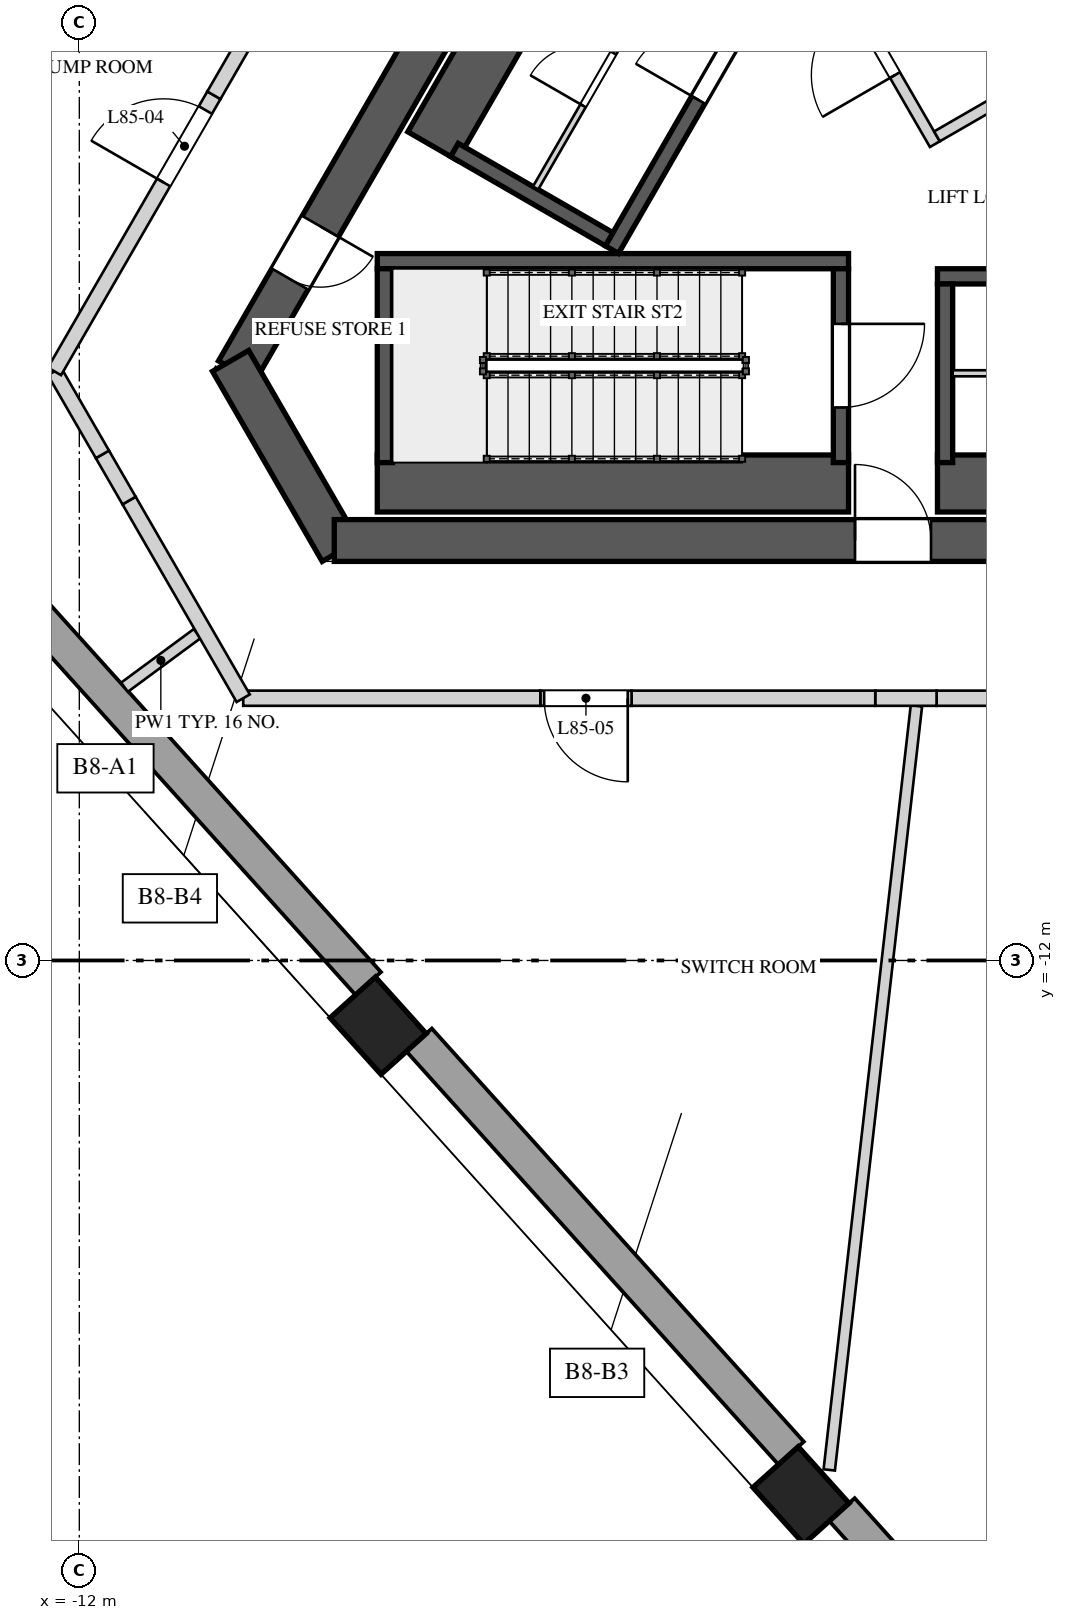
"""IFC4 building model, lengths in metres.
Left out: names, types, materials, properties, quantities, classifications, styles, units other than length and angle.
Written with IfcOpenShell. Run it as: python <this file> out.ifc"""

import sys

from ifc_helpers import new_model, si_unit, direction, frame, frame_2d, origin, origin_2d, place, context, subcontext, project, spatial, polyline, rectangle, outline, extrude, element, fill, save


model = new_model("IFC4")
c1 = context("Model", 3, precision=1e-05, world=origin(), true_north=direction((0.0, 1.0)))
c2 = subcontext(c1, "Body", "Model", "MODEL_VIEW")
j1 = project(units=[si_unit("LENGTHUNIT", "METRE"), si_unit("PLANEANGLEUNIT", "RADIAN")], contexts=[c1])
p1 = place(None, origin())
s1 = spatial("IfcSite", under=j1, at=p1, CompositionType="ELEMENT")
p2 = place(p1, origin())
s2 = spatial("IfcBuilding", under=s1, at=p2, CompositionType="ELEMENT")
p3 = place(p2, frame((0.0, 0.0, 370.4)))
s3 = spatial("IfcBuildingStorey", under=s2, at=p3, CompositionType="ELEMENT", Elevation=370.4)
p4 = place(p3, frame((-1.285, 10.725, 0.0), z_axis=(0.0, 0.0, 1.0), x_axis=(-0.499994590896, -0.86602852671, 0.0)))
e1 = element("IfcWall", 1, at=p4, inside=s3, PredefinedType="SHEAR", context=c2, shape_type="SweptSolid", body=[
    extrude(rectangle(XDim=17.292, YDim=0.55, at=frame_2d((8.646, 0.0))), origin(), (0.0, 0.0, 1.0), 4.5),
])
p5 = place(p4, frame((6.851, 0.0, 0.0)))
e2 = element("IfcOpeningElement", 2, at=p5, cuts=e1, PredefinedType="OPENING", context=c2, shape_type="SweptSolid", body=[
    extrude(rectangle(XDim=1.0, YDim=2.4, at=frame_2d((0.5, 1.2))), frame((0.0, 0.285, 0.0), z_axis=(0.0, -1.0, 0.0), x_axis=(1.0, 0.0, 0.0)), (0.0, 0.0, 1.0), 0.57),
])
p6 = place(p4, frame((15.089, 0.0, 0.0)))
e3 = element("IfcOpeningElement", 3, at=p6, cuts=e1, PredefinedType="OPENING", context=c2, shape_type="SweptSolid", body=[
    extrude(rectangle(XDim=0.8, YDim=2.1, at=frame_2d((0.4, 1.05))), frame((0.0, 0.285, 0.0), z_axis=(0.0, -1.0, 0.0), x_axis=(1.0, 0.0, 0.0)), (0.0, 0.0, 1.0), 0.57),
])
p7 = place(p3, frame((-10.01, -4.113, 0.0), z_axis=(0.0, 0.0, 1.0), x_axis=(0.499995765644, -0.866027848477, 0.0)))
e4 = element("IfcWall", 4, at=p7, inside=s3, PredefinedType="SHEAR", context=c2, shape_type="SweptSolid", body=[
    extrude(rectangle(XDim=2.887, YDim=0.55, at=frame_2d((1.443, 0.0))), origin(), (0.0, 0.0, 1.0), 4.5),
])
p8 = place(p3, frame((-8.646, -6.475, 0.0), z_axis=(0.0, 0.0, 1.0), x_axis=(1.0, 0.0, 0.0)))
e5 = element("IfcWall", 5, at=p8, inside=s3, PredefinedType="SHEAR", context=c2, shape_type="SweptSolid", body=[
    extrude(rectangle(XDim=17.292, YDim=0.55, at=frame_2d((8.646, 0.0))), origin(), (0.0, 0.0, 1.0), 4.5),
])
p9 = place(p8, frame((6.851, 0.0, 0.0)))
e6 = element("IfcOpeningElement", 6, at=p9, cuts=e5, PredefinedType="OPENING", context=c2, shape_type="SweptSolid", body=[
    extrude(rectangle(XDim=1.0, YDim=2.4, at=frame_2d((0.5, 1.2))), frame((0.0, 0.285, 0.0), z_axis=(0.0, -1.0, 0.0), x_axis=(1.0, 0.0, 0.0)), (0.0, 0.0, 1.0), 0.57),
])
p10 = place(p8, frame((15.089, 0.0, 0.0)))
e7 = element("IfcOpeningElement", 7, at=p10, cuts=e5, PredefinedType="OPENING", context=c2, shape_type="SweptSolid", body=[
    extrude(rectangle(XDim=0.8, YDim=2.1, at=frame_2d((0.4, 1.05))), frame((0.0, 0.285, 0.0), z_axis=(0.0, -1.0, 0.0), x_axis=(1.0, 0.0, 0.0)), (0.0, 0.0, 1.0), 0.57),
])
for number, where, z_axis, x_axis in (
    (8, (-8.068, -12.858, 0.0), (0.0, 0.0, 1.0), (0.669, -0.743, 0.0)),
    (9, (-2.505, -19.037, 0.0), (0.0, 0.0, 1.0), (0.669, -0.743, 0.0)),
):
    element("IfcColumn", number, at=place(p3, frame(where, z_axis=z_axis, x_axis=x_axis)), inside=s3, PredefinedType="COLUMN", context=c2, shape_type="SweptSolid", body=[
        extrude(rectangle(XDim=1.0, YDim=0.8, at=origin_2d()), origin(), (0.0, 0.0, 1.0), 4.5),
    ])
p11 = place(p3, frame((-13.093, -6.868, 0.0), z_axis=(0.0, 0.0, 1.0), x_axis=(0.669136224502, -0.74313976684, 0.0)))
e10 = element("IfcWall", 10, at=p11, inside=s3, PredefinedType="SOLIDWALL", context=c2, shape_type="SweptSolid", body=[
    extrude(rectangle(XDim=7.314, YDim=0.45, at=frame_2d((3.657, 0.0))), origin(), (0.0, 0.0, 1.0), 3.8),
])
p12 = place(p3, frame((-7.53, -13.046, 0.0), z_axis=(0.0, 0.0, 1.0), x_axis=(0.669152823362, -0.743124820597, 0.0)))
e11 = element("IfcWall", 11, at=p12, inside=s3, PredefinedType="SOLIDWALL", context=c2, shape_type="SweptSolid", body=[
    extrude(rectangle(XDim=7.314, YDim=0.45, at=frame_2d((3.657, 0.0))), origin(), (0.0, 0.0, 1.0), 3.8),
])
p13 = place(p3, frame((-1.966, -19.224, 0.0), z_axis=(0.0, 0.0, 1.0), x_axis=(0.66911941145, -0.743154905266, 0.0)))
e12 = element("IfcWall", 12, at=p13, inside=s3, PredefinedType="SOLIDWALL", context=c2, shape_type="SweptSolid", body=[
    extrude(rectangle(XDim=6.714, YDim=0.45, at=frame_2d((3.357, 0.0))), origin(), (0.0, 0.0, 1.0), 3.8),
])
p14 = place(p3, frame((-8.08, -5.725, 0.0), z_axis=(0.0, 0.0, 1.0), x_axis=(1.0, 0.0, 0.0)))
e13 = element("IfcWall", 13, at=p14, inside=s3, PredefinedType="SOLIDWALL", context=c2, shape_type="SweptSolid", body=[
    extrude(rectangle(XDim=6.2, YDim=0.75, at=frame_2d((3.1, 0.0))), origin(), (0.0, 0.0, 1.0), 4.15),
])
p15 = place(p3, frame((-8.08, -2.8, 0.0), z_axis=(0.0, 0.0, 1.0), x_axis=(1.0, 0.0, 0.0)))
e14 = element("IfcWall", 14, at=p15, inside=s3, PredefinedType="SOLIDWALL", context=c2, shape_type="SweptSolid", body=[
    extrude(rectangle(XDim=6.2, YDim=0.2, at=frame_2d((3.1, 0.0))), origin(), (0.0, 0.0, 1.0), 4.15),
])
p16 = place(p3, frame((-7.98, -2.9, 0.0), z_axis=(0.0, 0.0, 1.0), x_axis=(0.0, -1.0, 0.0)))
e15 = element("IfcWall", 15, at=p16, inside=s3, PredefinedType="SOLIDWALL", context=c2, shape_type="SweptSolid", body=[
    extrude(rectangle(XDim=2.55, YDim=0.2, at=frame_2d((1.275, 0.0))), origin(), (0.0, 0.0, 1.0), 4.15),
])
p17 = place(p3, frame((-1.98, -2.9, 0.0), z_axis=(0.0, 0.0, 1.0), x_axis=(0.0, -1.0, 0.0)))
e16 = element("IfcWall", 16, at=p17, inside=s3, PredefinedType="SOLIDWALL", context=c2, shape_type="SweptSolid", body=[
    extrude(rectangle(XDim=2.55, YDim=0.2, at=frame_2d((1.275, 0.0))), origin(), (0.0, 0.0, 1.0), 4.15),
])
p18 = place(p17, frame((0.725, 0.0, 0.0)))
e17 = element("IfcOpeningElement", 17, at=p18, cuts=e16, PredefinedType="OPENING", context=c2, shape_type="SweptSolid", body=[
    extrude(rectangle(XDim=1.1, YDim=2.4, at=frame_2d((0.55, 1.2))), frame((0.0, 0.11, 0.0), z_axis=(0.0, -1.0, 0.0), x_axis=(1.0, 0.0, 0.0)), (0.0, 0.0, 1.0), 0.22),
])
p19 = place(p3, frame((-4.993, -2.648, 0.0), z_axis=(0.0, 0.0, 1.0), x_axis=(0.499996545922, 0.866027397988, 0.0)))
e18 = element("IfcWall", 18, at=p19, inside=s3, PredefinedType="SOLIDWALL", context=c2, shape_type="SweptSolid", body=[
    extrude(rectangle(XDim=5.5, YDim=0.2, at=frame_2d((2.75, 0.0))), origin(), (0.0, 0.0, 1.0), 4.15),
])
p20 = place(p19, frame((2.275, 0.0, 0.0)))
e19 = element("IfcOpeningElement", 19, at=p20, cuts=e18, PredefinedType="OPENING", context=c2, shape_type="SweptSolid", body=[
    extrude(rectangle(XDim=0.95, YDim=2.4, at=frame_2d((0.475, 1.2))), frame((0.0, 0.11, 0.0), z_axis=(0.0, -1.0, 0.0), x_axis=(1.0, 0.0, 0.0)), (0.0, 0.0, 1.0), 0.22),
])
p21 = place(p3, frame((-4.603, 3.477, 0.0), z_axis=(0.0, 0.0, 1.0), x_axis=(-0.500015767406, -0.866016300277, 0.0)))
e20 = element("IfcWall", 20, at=p21, inside=s3, PredefinedType="SOLIDWALL", context=c2, shape_type="SweptSolid", body=[
    extrude(rectangle(XDim=5.5, YDim=0.75, at=frame_2d((2.75, 0.0))), origin(), (0.0, 0.0, 1.0), 4.15),
])
p22 = place(p3, frame((-5.03, -2.512, 0.0), z_axis=(0.0, 0.0, 1.0), x_axis=(-0.866016039709, 0.500016218704, 0.0)))
e21 = element("IfcWall", 21, at=p22, inside=s3, PredefinedType="SOLIDWALL", context=c2, shape_type="SweptSolid", body=[
    extrude(rectangle(XDim=2.35, YDim=0.2, at=frame_2d((1.175, 0.0))), origin(), (0.0, 0.0, 1.0), 4.15),
])
p23 = place(p3, frame((-5.997, -1.838, 0.0), z_axis=(0.0, 0.0, 1.0), x_axis=(0.500005610874, 0.86602216432, 0.0)))
e22 = element("IfcWall", 22, at=p23, inside=s3, PredefinedType="PARTITIONING", context=c2, shape_type="SweptSolid", body=[
    extrude(rectangle(XDim=5.1, YDim=0.08, at=frame_2d((2.55, 0.0))), origin(), (0.0, 0.0, 1.0), 4.15),
])
p24 = place(p23, frame((1.25, 0.0, 0.0)))
e23 = element("IfcOpeningElement", 23, at=p24, cuts=e22, PredefinedType="OPENING", context=c2, shape_type="SweptSolid", body=[
    extrude(rectangle(XDim=0.8, YDim=2.1, at=frame_2d((0.4, 1.05))), frame((0.0, 0.05, 0.0), z_axis=(0.0, -1.0, 0.0), x_axis=(1.0, 0.0, 0.0)), (0.0, 0.0, 1.0), 0.1),
])
p25 = place(p3, frame((4.79, -3.0, 0.0), z_axis=(0.0, 0.0, 1.0), x_axis=(-1.0, 0.0, 0.0)))
e24 = element("IfcWall", 24, at=p25, inside=s3, PredefinedType="SOLIDWALL", context=c2, shape_type="SweptSolid", body=[
    extrude(rectangle(XDim=5.5, YDim=0.2, at=frame_2d((2.75, 0.0))), origin(), (0.0, 0.0, 1.0), 4.15),
])
p26 = place(p25, frame((2.275, 0.0, 0.0)))
e25 = element("IfcOpeningElement", 25, at=p26, cuts=e24, PredefinedType="OPENING", context=c2, shape_type="SweptSolid", body=[
    extrude(rectangle(XDim=0.95, YDim=2.4, at=frame_2d((0.475, 1.2))), frame((0.0, 0.11, 0.0), z_axis=(0.0, -1.0, 0.0), x_axis=(1.0, 0.0, 0.0)), (0.0, 0.0, 1.0), 0.22),
])
p27 = place(p3, frame((-0.71, -5.725, 0.0), z_axis=(0.0, 0.0, 1.0), x_axis=(1.0, 0.0, 0.0)))
e26 = element("IfcWall", 26, at=p27, inside=s3, PredefinedType="SOLIDWALL", context=c2, shape_type="SweptSolid", body=[
    extrude(rectangle(XDim=5.5, YDim=0.75, at=frame_2d((2.75, 0.0))), origin(), (0.0, 0.0, 1.0), 4.15),
])
p28 = place(p3, frame((-0.61, -3.1, 0.0), z_axis=(0.0, 0.0, 1.0), x_axis=(0.0, -1.0, 0.0)))
e27 = element("IfcWall", 27, at=p28, inside=s3, PredefinedType="SOLIDWALL", context=c2, shape_type="SweptSolid", body=[
    extrude(rectangle(XDim=2.35, YDim=0.2, at=frame_2d((1.175, 0.0))), origin(), (0.0, 0.0, 1.0), 4.15),
])
p29 = place(p3, frame((4.59, -4.275, 0.0), z_axis=(0.0, 0.0, 1.0), x_axis=(-1.0, 0.0, 0.0)))
e28 = element("IfcWall", 28, at=p29, inside=s3, PredefinedType="PARTITIONING", context=c2, shape_type="SweptSolid", body=[
    extrude(rectangle(XDim=5.1, YDim=0.08, at=frame_2d((2.55, 0.0))), origin(), (0.0, 0.0, 1.0), 4.15),
])
p30 = place(p29, frame((1.25, 0.0, 0.0)))
e29 = element("IfcOpeningElement", 29, at=p30, cuts=e28, PredefinedType="OPENING", context=c2, shape_type="SweptSolid", body=[
    extrude(rectangle(XDim=0.8, YDim=2.1, at=frame_2d((0.4, 1.05))), frame((0.0, 0.05, 0.0), z_axis=(0.0, -1.0, 0.0), x_axis=(1.0, 0.0, 0.0)), (0.0, 0.0, 1.0), 0.1),
])
p31 = place(p3, frame((-0.744, -1.261, 0.0), z_axis=(0.0, 0.0, 1.0), x_axis=(-0.500004234368, 0.866022959057, 0.0)))
e30 = element("IfcWall", 30, at=p31, inside=s3, PredefinedType="PARTITIONING", context=c2, shape_type="SweptSolid", body=[
    extrude(rectangle(XDim=3.125, YDim=0.15, at=frame_2d((1.562, 0.0))), origin(), (0.0, 0.0, 1.0), 4.15),
])
p32 = place(p31, frame((1.05, 0.0, 0.0)))
e31 = element("IfcOpeningElement", 31, at=p32, cuts=e30, PredefinedType="OPENING", context=c2, shape_type="SweptSolid", body=[
    extrude(rectangle(XDim=1.1, YDim=2.4, at=frame_2d((0.55, 1.2))), frame((0.0, 0.085, 0.0), z_axis=(0.0, -1.0, 0.0), x_axis=(1.0, 0.0, 0.0)), (0.0, 0.0, 1.0), 0.17),
])
p33 = place(p3, frame((-0.717, -1.159, 0.0), z_axis=(0.0, 0.0, 1.0), x_axis=(0.866008176907, 0.50002983664, 0.0)))
e32 = element("IfcWall", 32, at=p33, inside=s3, PredefinedType="PARTITIONING", context=c2, shape_type="SweptSolid", body=[
    extrude(rectangle(XDim=3.3, YDim=0.15, at=frame_2d((1.65, 0.0))), origin(), (0.0, 0.0, 1.0), 4.15),
])
p34 = place(p3, frame((-10.45, -7.701, 0.0), z_axis=(0.0, 0.0, 1.0), x_axis=(-0.805029994767, -0.593234108532, 0.0)))
e33 = element("IfcWall", 33, at=p34, inside=s3, PredefinedType="PARTITIONING", context=c2, shape_type="SweptSolid", body=[
    extrude(rectangle(XDim=1.187, YDim=0.15, at=frame_2d((0.594, 0.0))), origin(), (0.0, 0.0, 1.0), 4.15),
])
p35 = place(p3, frame((-0.987, -8.65, 0.0), z_axis=(0.0, 0.0, 1.0), x_axis=(-0.113368279169, -0.99355303496, 0.0)))
e34 = element("IfcWall", 34, at=p35, inside=s3, PredefinedType="PARTITIONING", context=c2, shape_type="SweptSolid", body=[
    extrude(rectangle(XDim=10.117, YDim=0.15, at=frame_2d((5.059, 0.0))), origin(), (0.0, 0.0, 1.0), 3.25),
])
p36 = place(p3, frame((0.159, -8.55, 0.0), z_axis=(0.0, 0.0, 1.0), x_axis=(-1.0, 0.0, 0.0)))
e35 = element("IfcWall", 35, at=p36, inside=s3, PredefinedType="SOLIDWALL", context=c2, shape_type="SweptSolid", body=[
    extrude(rectangle(XDim=0.881, YDim=0.2, at=frame_2d((0.44, 0.0))), origin(), (0.0, 0.0, 1.0), 4.15),
])
p37 = place(p3, frame((-0.722, -8.55, 0.0), z_axis=(0.0, 0.0, 1.0), x_axis=(-1.0, 0.0, 0.0)))
e36 = element("IfcWall", 36, at=p37, inside=s3, PredefinedType="SOLIDWALL", context=c2, shape_type="SweptSolid", body=[
    extrude(rectangle(XDim=0.807, YDim=0.2, at=frame_2d((0.403, 0.0))), origin(), (0.0, 0.0, 1.0), 3.25),
])
p38 = place(p3, frame((-1.529, -8.55, 0.0), z_axis=(0.0, 0.0, 1.0), x_axis=(-1.0, 0.0, 0.0)))
e37 = element("IfcWall", 37, at=p38, inside=s3, PredefinedType="SOLIDWALL", context=c2, shape_type="SweptSolid", body=[
    extrude(rectangle(XDim=3.206, YDim=0.2, at=frame_2d((1.603, 0.0))), origin(), (0.0, 0.0, 1.0), 4.15),
])
p39 = place(p3, frame((-4.735, -8.55, 0.0), z_axis=(0.0, 0.0, 1.0), x_axis=(-1.0, 0.0, 0.0)))
e38 = element("IfcWall", 38, at=p39, inside=s3, PredefinedType="SOLIDWALL", context=c2, shape_type="SweptSolid", body=[
    extrude(outline(polyline([(0.0, 0.0), (1.2, 0.0), (1.2, 4.15), (1.043, 4.15), (1.043, 3.45), (0.217, 3.45), (0.217, 4.15), (0.0, 4.15), (0.0, 0.0)])), frame((0.0, 0.1, 0.0), z_axis=(0.0, -1.0, 0.0), x_axis=(1.0, 0.0, 0.0)), (0.0, 0.0, 1.0), 0.2),
])
p40 = place(p39, frame((0.05, 0.0, 0.0)))
e39 = element("IfcOpeningElement", 39, at=p40, cuts=e38, PredefinedType="OPENING", context=c2, shape_type="SweptSolid", body=[
    extrude(rectangle(XDim=1.1, YDim=2.4, at=frame_2d((0.55, 1.2))), frame((0.0, 0.11, 0.0), z_axis=(0.0, -1.0, 0.0), x_axis=(1.0, 0.0, 0.0)), (0.0, 0.0, 1.0), 0.22),
])
p41 = place(p3, frame((-5.935, -8.55, 0.0), z_axis=(0.0, 0.0, 1.0), x_axis=(-1.0, 0.0, 0.0)))
e40 = element("IfcWall", 40, at=p41, inside=s3, PredefinedType="SOLIDWALL", context=c2, shape_type="SweptSolid", body=[
    extrude(rectangle(XDim=3.909, YDim=0.2, at=frame_2d((1.955, 0.0))), origin(), (0.0, 0.0, 1.0), 4.15),
])
p42 = place(p3, frame((-9.844, -8.55, 0.0), z_axis=(0.0, 0.0, 1.0), x_axis=(-0.500003959331, 0.866023117852, 0.0)))
e41 = element("IfcWall", 41, at=p42, inside=s3, PredefinedType="SOLIDWALL", context=c2, shape_type="SweptSolid", body=[
    extrude(rectangle(XDim=3.003, YDim=0.2, at=frame_2d((1.501, 0.0))), origin(), (0.0, 0.0, 1.0), 4.15),
])
p43 = place(p3, frame((-11.345, -5.949, 0.0), z_axis=(0.0, 0.0, 1.0), x_axis=(-0.499993523031, 0.866029143232, 0.0)))
e42 = element("IfcWall", 42, at=p43, inside=s3, PredefinedType="SOLIDWALL", context=c2, shape_type="SweptSolid", body=[
    extrude(rectangle(XDim=0.702, YDim=0.2, at=frame_2d((0.351, 0.0))), origin(), (0.0, 0.0, 1.0), 3.45),
])
p44 = place(p3, frame((-11.696, -5.342, 0.0), z_axis=(0.0, 0.0, 1.0), x_axis=(-0.500013012896, 0.866017890655, 0.0)))
e43 = element("IfcWall", 43, at=p44, inside=s3, PredefinedType="SOLIDWALL", context=c2, shape_type="SweptSolid", body=[
    extrude(rectangle(XDim=1.261, YDim=0.2, at=frame_2d((0.63, 0.0))), origin(), (0.0, 0.0, 1.0), 4.15),
])
p45 = place(p3, frame((-12.326, -4.25, 0.0), z_axis=(0.0, 0.0, 1.0), x_axis=(0.499982771656, 0.866035350345, 0.0)))
e44 = element("IfcWall", 44, at=p45, inside=s3, PredefinedType="SOLIDWALL", context=c2, shape_type="SweptSolid", body=[
    extrude(rectangle(XDim=4.195, YDim=0.2, at=frame_2d((2.097, 0.0))), origin(), (0.0, 0.0, 1.0), 4.15),
])
p46 = place(p45, frame((2.87, 0.0, 0.0)))
e45 = element("IfcOpeningElement", 45, at=p46, cuts=e44, PredefinedType="OPENING", context=c2, shape_type="SweptSolid", body=[
    extrude(rectangle(XDim=1.1, YDim=2.4, at=frame_2d((0.55, 1.2))), frame((0.0, 0.11, 0.0), z_axis=(0.0, -1.0, 0.0), x_axis=(1.0, 0.0, 0.0)), (0.0, 0.0, 1.0), 0.22),
])
p47 = place(p3, frame((-10.229, -0.617, 0.0), z_axis=(0.0, 0.0, 1.0), x_axis=(0.5001686003, 0.865928040471, 0.0)))
e46 = element("IfcWall", 46, at=p47, inside=s3, PredefinedType="SOLIDWALL", context=c2, shape_type="SweptSolid", body=[
    extrude(rectangle(XDim=0.821, YDim=0.2, at=frame_2d((0.411, 0.0))), origin(), (0.0, 0.0, 1.0), 3.45),
])
p48 = place(p18, origin())
e47 = element("IfcDoor", 47, at=p48, inside=s3, OperationType="SINGLE_SWING_LEFT", PredefinedType="DOOR", context=c2, shape_type="SweptSolid", body=[
    extrude(rectangle(XDim=1.1, YDim=2.4, at=frame_2d((0.55, 1.2))), frame((0.0, 0.025, 0.0), z_axis=(0.0, -1.0, 0.0), x_axis=(1.0, 0.0, 0.0)), (0.0, 0.0, 1.0), 0.05),
])
fill(e17, e47)
p49 = place(p20, origin())
e48 = element("IfcDoor", 48, at=p49, inside=s3, OperationType="SINGLE_SWING_LEFT", PredefinedType="DOOR", context=c2, shape_type="SweptSolid", body=[
    extrude(rectangle(XDim=0.95, YDim=2.4, at=frame_2d((0.475, 1.2))), frame((0.0, 0.025, 0.0), z_axis=(0.0, -1.0, 0.0), x_axis=(1.0, 0.0, 0.0)), (0.0, 0.0, 1.0), 0.05),
])
fill(e19, e48)
p50 = place(p24, origin())
e49 = element("IfcDoor", 49, at=p50, inside=s3, OperationType="SINGLE_SWING_RIGHT", PredefinedType="DOOR", context=c2, shape_type="SweptSolid", body=[
    extrude(rectangle(XDim=0.8, YDim=2.1, at=frame_2d((0.4, 1.05))), frame((0.0, 0.025, 0.0), z_axis=(0.0, -1.0, 0.0), x_axis=(1.0, 0.0, 0.0)), (0.0, 0.0, 1.0), 0.05),
])
fill(e23, e49)
p51 = place(p32, origin())
e50 = element("IfcDoor", 50, at=p51, inside=s3, OperationType="SINGLE_SWING_LEFT", PredefinedType="DOOR", context=c2, shape_type="SweptSolid", body=[
    extrude(rectangle(XDim=1.1, YDim=2.4, at=frame_2d((0.55, 1.2))), frame((0.0, 0.025, 0.0), z_axis=(0.0, -1.0, 0.0), x_axis=(1.0, 0.0, 0.0)), (0.0, 0.0, 1.0), 0.05),
])
fill(e31, e50)
p52 = place(p9, origin())
e51 = element("IfcDoor", 51, at=p52, inside=s3, OperationType="SINGLE_SWING_LEFT", PredefinedType="DOOR", context=c2, shape_type="SweptSolid", body=[
    extrude(rectangle(XDim=1.0, YDim=2.4, at=frame_2d((0.5, 1.2))), frame((0.0, 0.025, 0.0), z_axis=(0.0, -1.0, 0.0), x_axis=(1.0, 0.0, 0.0)), (0.0, 0.0, 1.0), 0.05),
])
fill(e6, e51)
p53 = place(p6, origin())
e52 = element("IfcDoor", 52, at=p53, inside=s3, OperationType="SINGLE_SWING_LEFT", PredefinedType="DOOR", context=c2, shape_type="SweptSolid", body=[
    extrude(rectangle(XDim=0.8, YDim=2.1, at=frame_2d((0.4, 1.05))), frame((0.0, 0.025, 0.0), z_axis=(0.0, -1.0, 0.0), x_axis=(1.0, 0.0, 0.0)), (0.0, 0.0, 1.0), 0.05),
])
fill(e3, e52)
p54 = place(p46, origin())
e53 = element("IfcDoor", 53, at=p54, inside=s3, OperationType="SINGLE_SWING_RIGHT", PredefinedType="DOOR", context=c2, shape_type="SweptSolid", body=[
    extrude(rectangle(XDim=1.1, YDim=2.4, at=frame_2d((0.55, 1.2))), frame((0.0, 0.025, 0.0), z_axis=(0.0, -1.0, 0.0), x_axis=(1.0, 0.0, 0.0)), (0.0, 0.0, 1.0), 0.05),
])
fill(e45, e53)
p55 = place(p40, origin())
e54 = element("IfcDoor", 54, at=p55, inside=s3, OperationType="SINGLE_SWING_LEFT", PredefinedType="DOOR", context=c2, shape_type="SweptSolid", body=[
    extrude(rectangle(XDim=1.1, YDim=2.4, at=frame_2d((0.55, 1.2))), frame((0.0, 0.025, 0.0), z_axis=(0.0, -1.0, 0.0), x_axis=(1.0, 0.0, 0.0)), (0.0, 0.0, 1.0), 0.05),
])
fill(e39, e54)
save(model, sys.argv[1])
